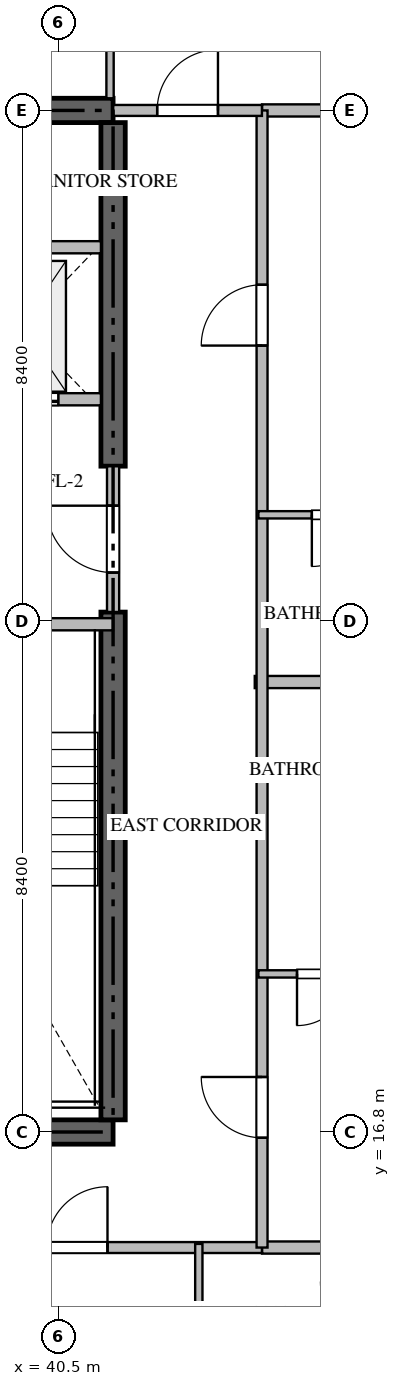
"""IFC4 building model, lengths in metres.
Left out: names, types, materials, properties, quantities, classifications, styles, units other than length and angle.
Written with IfcOpenShell. Run it as: python <this file> out.ifc"""

import sys

from ifc_helpers import new_model, si_unit, direction, frame, frame_2d, origin, place, context, subcontext, project, spatial, rectangle, extrude, source, transform, mapped, element, fill, save


model = new_model("IFC4")
c1 = context("Model", 3, precision=1e-05, world=origin(), true_north=direction((0.0, 1.0)))
c2 = subcontext(c1, "Body", "Model", "MODEL_VIEW")
j1 = project(units=[si_unit("LENGTHUNIT", "METRE"), si_unit("PLANEANGLEUNIT", "RADIAN")], contexts=[c1])
p1 = place(None, origin())
s1 = spatial("IfcSite", under=j1, at=p1, CompositionType="ELEMENT")
p2 = place(p1, origin())
s2 = spatial("IfcBuilding", under=s1, at=p2, CompositionType="ELEMENT")
p3 = place(p2, frame((0.0, 0.0, 157.65)))
s3 = spatial("IfcBuildingStorey", under=s2, at=p3, CompositionType="ELEMENT", Elevation=157.65)
for number, where, z_axis, x_axis in (
    (1, (23.4, 16.8, -0.26), (0.0, 0.0, 1.0), (1.0, 0.0, 0.0)),
    (2, (41.4, 33.6, -0.26), (0.0, 0.0, 1.0), (-1.0, 0.0, 0.0)),
):
    element("IfcWall", number, at=place(p3, frame(where, z_axis=z_axis, x_axis=x_axis)), inside=s3, PredefinedType="SHEAR", context=c2, shape_type="SweptSolid", body=[
        extrude(rectangle(XDim=18.0, YDim=0.4, at=frame_2d((9.0, 0.0))), origin(), (0.0, 0.0, 1.0), 3.748),
    ])
p4 = place(p3, frame((41.4, 17.0, -0.26), z_axis=(0.0, 0.0, 1.0), x_axis=(0.0, 1.0, 0.0)))
e3 = element("IfcWall", 3, at=p4, inside=s3, PredefinedType="SHEAR", context=c2, shape_type="SweptSolid", body=[
    extrude(rectangle(XDim=8.35, YDim=0.4, at=frame_2d((4.175, 0.0))), origin(), (0.0, 0.0, 1.0), 3.748),
])
p5 = place(p3, frame((41.4, 27.75, -0.26), z_axis=(0.0, 0.0, 1.0), x_axis=(0.0, 1.0, 0.0)))
e4 = element("IfcWall", 4, at=p5, inside=s3, PredefinedType="SHEAR", context=c2, shape_type="SweptSolid", body=[
    extrude(rectangle(XDim=5.65, YDim=0.4, at=frame_2d((2.825, 0.0))), origin(), (0.0, 0.0, 1.0), 3.748),
])
p6 = place(p3, frame((36.95, 25.15, 0.0), z_axis=(0.0, 0.0, 1.0), x_axis=(1.0, 0.0, 0.0)))
e5 = element("IfcWall", 5, at=p6, inside=s3, PredefinedType="STANDARD", context=c2, shape_type="SweptSolid", body=[
    extrude(rectangle(XDim=4.45, YDim=0.2, at=frame_2d((2.225, 0.0))), origin(), (0.0, 0.0, 1.0), 3.49),
])
p7 = place(p6, frame((1.65, 0.0, 0.0)))
e6 = element("IfcOpeningElement", 6, at=p7, cuts=e5, PredefinedType="OPENING", context=c2, shape_type="SweptSolid", body=[
    extrude(rectangle(XDim=1.1, YDim=2.15, at=frame_2d((0.55, 1.075))), frame((0.0, 0.11, 0.0), z_axis=(0.0, -1.0, 0.0), x_axis=(1.0, 0.0, 0.0)), (0.0, 0.0, 1.0), 0.22),
])
p8 = place(p3, frame((38.75, 28.85, 0.0), z_axis=(0.0, 0.0, 1.0), x_axis=(1.0, 0.0, 0.0)))
e7 = element("IfcWall", 7, at=p8, inside=s3, PredefinedType="STANDARD", context=c2, shape_type="SweptSolid", body=[
    extrude(rectangle(XDim=2.45, YDim=0.2, at=frame_2d((1.225, 0.0))), origin(), (0.0, 0.0, 1.0), 3.49),
])
p9 = place(p8, frame((0.55, 0.0, 0.0)))
e8 = element("IfcOpeningElement", 8, at=p9, cuts=e7, PredefinedType="OPENING", context=c2, shape_type="SweptSolid", body=[
    extrude(rectangle(XDim=1.2, YDim=2.2, at=frame_2d((0.6, 1.1))), frame((0.0, 0.11, 0.0), z_axis=(0.0, -1.0, 0.0), x_axis=(1.0, 0.0, 0.0)), (0.0, 0.0, 1.0), 0.22),
])
p10 = place(p3, frame((38.75, 31.35, 0.0), z_axis=(0.0, 0.0, 1.0), x_axis=(1.0, 0.0, 0.0)))
e9 = element("IfcWall", 9, at=p10, inside=s3, PredefinedType="STANDARD", context=c2, shape_type="SweptSolid", body=[
    extrude(rectangle(XDim=2.45, YDim=0.2, at=frame_2d((1.225, 0.0))), origin(), (0.0, 0.0, 1.0), 3.49),
])
p11 = place(p3, frame((41.4, 25.352, 0.0), z_axis=(0.0, 0.0, 1.0), x_axis=(0.0, 1.0, 0.0)))
e10 = element("IfcWall", 10, at=p11, inside=s3, PredefinedType="STANDARD", context=c2, shape_type="SweptSolid", body=[
    extrude(rectangle(XDim=2.396, YDim=0.2, at=frame_2d((1.198, 0.0))), origin(), (0.0, 0.0, 1.0), 3.49),
])
p12 = place(p11, frame((0.648, 0.0, 0.0)))
e11 = element("IfcOpeningElement", 11, at=p12, cuts=e10, PredefinedType="OPENING", context=c2, shape_type="SweptSolid", body=[
    extrude(rectangle(XDim=1.1, YDim=2.15, at=frame_2d((0.55, 1.075))), frame((0.0, 0.11, 0.0), z_axis=(0.0, -1.0, 0.0), x_axis=(1.0, 0.0, 0.0)), (0.0, 0.0, 1.0), 0.22),
])
p13 = place(p3, frame((43.73, 24.2, 0.0), z_axis=(0.0, 0.0, 1.0), x_axis=(1.0, 0.0, 0.0)))
e12 = element("IfcWall", 12, at=p13, inside=s3, PredefinedType="PARTITIONING", context=c2, shape_type="SweptSolid", body=[
    extrude(rectangle(XDim=13.188, YDim=0.2, at=frame_2d((6.594, 0.0))), origin(), (0.0, 0.0, 1.0), 3.49),
])
for number, where, z_axis, x_axis in (
    (13, (43.85, 14.9, 0.0), (0.0, 0.0, 1.0), (1.0, 0.0, 0.0)),
    (14, (43.85, 33.6, 0.0), (0.0, 0.0, 1.0), (1.0, 0.0, 0.0)),
):
    element("IfcWall", number, at=place(p3, frame(where, z_axis=z_axis, x_axis=x_axis)), inside=s3, PredefinedType="PARTITIONING", context=c2, shape_type="SweptSolid", body=[
        extrude(rectangle(XDim=13.068, YDim=0.2, at=frame_2d((6.534, 0.0))), origin(), (0.0, 0.0, 1.0), 3.49),
    ])
p14 = place(p3, frame((20.952, 14.9, 0.0), z_axis=(0.0, 0.0, 1.0), x_axis=(1.0, 0.0, 0.0)))
e15 = element("IfcWall", 15, at=p14, inside=s3, PredefinedType="PARTITIONING", context=c2, shape_type="SweptSolid", body=[
    extrude(rectangle(XDim=22.896, YDim=0.18, at=frame_2d((11.448, 0.0))), origin(), (0.0, 0.0, 1.0), 3.49),
])
p15 = place(p14, frame((2.54, 0.0, 0.0)))
e16 = element("IfcOpeningElement", 16, at=p15, cuts=e15, PredefinedType="OPENING", context=c2, shape_type="SweptSolid", body=[
    extrude(rectangle(XDim=1.0, YDim=2.15, at=frame_2d((0.5, 1.075))), frame((0.0, 0.1, 0.0), z_axis=(0.0, -1.0, 0.0), x_axis=(1.0, 0.0, 0.0)), (0.0, 0.0, 1.0), 0.2),
])
p16 = place(p14, frame((6.985, 0.0, 0.0)))
e17 = element("IfcOpeningElement", 17, at=p16, cuts=e15, PredefinedType="OPENING", context=c2, shape_type="SweptSolid", body=[
    extrude(rectangle(XDim=1.0, YDim=2.15, at=frame_2d((0.5, 1.075))), frame((0.0, 0.1, 0.0), z_axis=(0.0, -1.0, 0.0), x_axis=(1.0, 0.0, 0.0)), (0.0, 0.0, 1.0), 0.2),
])
p17 = place(p14, frame((19.356, 0.0, 0.0)))
e18 = element("IfcOpeningElement", 18, at=p17, cuts=e15, PredefinedType="OPENING", context=c2, shape_type="SweptSolid", body=[
    extrude(rectangle(XDim=1.0, YDim=2.15, at=frame_2d((0.5, 1.075))), frame((0.0, 0.1, 0.0), z_axis=(0.0, -1.0, 0.0), x_axis=(1.0, 0.0, 0.0)), (0.0, 0.0, 1.0), 0.2),
])
p18 = place(p3, frame((43.85, 14.9, 0.0), z_axis=(0.0, 0.0, 1.0), x_axis=(0.0, 1.0, 0.0)))
e19 = element("IfcWall", 19, at=p18, inside=s3, PredefinedType="PARTITIONING", context=c2, shape_type="SweptSolid", body=[
    extrude(rectangle(XDim=18.7, YDim=0.18, at=frame_2d((9.35, 0.0))), origin(), (0.0, 0.0, 1.0), 3.49),
])
p19 = place(p18, frame((1.805, 0.0, 0.0)))
e20 = element("IfcOpeningElement", 20, at=p19, cuts=e19, PredefinedType="OPENING", context=c2, shape_type="SweptSolid", body=[
    extrude(rectangle(XDim=1.0, YDim=2.15, at=frame_2d((0.5, 1.075))), frame((0.0, 0.1, 0.0), z_axis=(0.0, -1.0, 0.0), x_axis=(1.0, 0.0, 0.0)), (0.0, 0.0, 1.0), 0.2),
])
p20 = place(p18, frame((14.833, 0.0, 0.0)))
e21 = element("IfcOpeningElement", 21, at=p20, cuts=e19, PredefinedType="OPENING", context=c2, shape_type="SweptSolid", body=[
    extrude(rectangle(XDim=1.0, YDim=2.15, at=frame_2d((0.5, 1.075))), frame((0.0, 0.1, 0.0), z_axis=(0.0, -1.0, 0.0), x_axis=(1.0, 0.0, 0.0)), (0.0, 0.0, 1.0), 0.2),
])
p21 = place(p3, frame((41.402, 33.6, 0.0), z_axis=(0.0, 0.0, 1.0), x_axis=(1.0, 0.0, 0.0)))
e22 = element("IfcWall", 22, at=p21, inside=s3, PredefinedType="PARTITIONING", context=c2, shape_type="SweptSolid", body=[
    extrude(rectangle(XDim=2.446, YDim=0.18, at=frame_2d((1.223, 0.0))), origin(), (0.0, 0.0, 1.0), 3.49),
])
p22 = place(p21, frame((0.723, 0.0, 0.0)))
e23 = element("IfcOpeningElement", 23, at=p22, cuts=e22, PredefinedType="OPENING", context=c2, shape_type="SweptSolid", body=[
    extrude(rectangle(XDim=1.0, YDim=2.15, at=frame_2d((0.5, 1.075))), frame((0.0, 0.1, 0.0), z_axis=(0.0, -1.0, 0.0), x_axis=(1.0, 0.0, 0.0)), (0.0, 0.0, 1.0), 0.2),
])
p23 = place(p3, frame((42.81, 12.15, 0.0), z_axis=(0.0, 0.0, 1.0), x_axis=(0.0, 1.0, 0.0)))
e24 = element("IfcWall", 24, at=p23, inside=s3, PredefinedType="PARTITIONING", context=c2, shape_type="SweptSolid", body=[
    extrude(rectangle(XDim=2.81, YDim=0.12, at=frame_2d((1.405, 0.0))), origin(), (0.0, 0.0, 1.0), 3.49),
])
p24 = place(p3, frame((41.35, 36.35, 0.0), z_axis=(0.0, 0.0, 1.0), x_axis=(0.0, -1.0, 0.0)))
e25 = element("IfcWall", 25, at=p24, inside=s3, PredefinedType="PARTITIONING", context=c2, shape_type="SweptSolid", body=[
    extrude(rectangle(XDim=2.55, YDim=0.12, at=frame_2d((1.275, 0.0))), origin(), (0.0, 0.0, 1.0), 3.49),
])
p25 = place(p3, frame((45.911, 19.4, 0.0), z_axis=(0.0, 0.0, 1.0), x_axis=(-1.0, 0.0, 0.0)))
e26 = element("IfcWall", 26, at=p25, inside=s3, PredefinedType="PARTITIONING", context=c2, shape_type="SweptSolid", body=[
    extrude(rectangle(XDim=2.121, YDim=0.12, at=frame_2d((1.061, 0.0))), origin(), (0.0, 0.0, 1.0), 3.49),
])
p26 = place(p25, frame((0.636, 0.0, 0.0)))
e27 = element("IfcOpeningElement", 27, at=p26, cuts=e26, PredefinedType="OPENING", context=c2, shape_type="SweptSolid", body=[
    extrude(rectangle(XDim=0.85, YDim=2.1, at=frame_2d((0.425, 1.05))), frame((0.0, 0.07, 0.0), z_axis=(0.0, -1.0, 0.0), x_axis=(1.0, 0.0, 0.0)), (0.0, 0.0, 1.0), 0.14),
])
p27 = place(p3, frame((46.398, 26.95, 0.0), z_axis=(0.0, 0.0, 1.0), x_axis=(-1.0, 0.0, 0.0)))
e28 = element("IfcWall", 28, at=p27, inside=s3, PredefinedType="PARTITIONING", context=c2, shape_type="SweptSolid", body=[
    extrude(rectangle(XDim=2.608, YDim=0.12, at=frame_2d((1.304, 0.0))), origin(), (0.0, 0.0, 1.0), 3.49),
])
p28 = place(p27, frame((0.879, 0.0, 0.0)))
e29 = element("IfcOpeningElement", 29, at=p28, cuts=e28, PredefinedType="OPENING", context=c2, shape_type="SweptSolid", body=[
    extrude(rectangle(XDim=0.85, YDim=2.1, at=frame_2d((0.425, 1.05))), frame((0.0, 0.07, 0.0), z_axis=(0.0, -1.0, 0.0), x_axis=(1.0, 0.0, 0.0)), (0.0, 0.0, 1.0), 0.14),
])
m1 = source(origin(), c2, "Body", "SweptSolid", [
    extrude(rectangle(XDim=1.2, YDim=2.2, at=frame_2d((0.6, 1.1))), frame((0.0, 0.025, 0.0), z_axis=(0.0, -1.0, 0.0), x_axis=(1.0, 0.0, 0.0)), (0.0, 0.0, 1.0), 0.05),
])
p29 = place(p9, origin())
e30 = element("IfcDoor", 30, at=p29, inside=s3, OperationType="DOUBLE_DOOR_SLIDING", PredefinedType="DOOR", context=c2, shape_type="MappedRepresentation", body=[
    mapped(m1, transform((0.0, 0.0, 0.0), scale=1.0)),
])
fill(e8, e30)
m2 = source(origin(), c2, "Body", "SweptSolid", [
    extrude(rectangle(XDim=1.1, YDim=2.15, at=frame_2d((0.55, 1.075))), frame((0.0, 0.025, 0.0), z_axis=(0.0, -1.0, 0.0), x_axis=(1.0, 0.0, 0.0)), (0.0, 0.0, 1.0), 0.05),
])
p30 = place(p12, origin())
e31 = element("IfcDoor", 31, at=p30, inside=s3, OperationType="SINGLE_SWING_RIGHT", PredefinedType="DOOR", context=c2, shape_type="MappedRepresentation", body=[
    mapped(m2, transform((0.0, 0.0, 0.0), scale=1.0)),
])
fill(e11, e31)
m3 = source(origin(), c2, "Body", "SweptSolid", [
    extrude(rectangle(XDim=1.0, YDim=2.15, at=frame_2d((0.5, 1.075))), frame((0.0, 0.025, 0.0), z_axis=(0.0, -1.0, 0.0), x_axis=(1.0, 0.0, 0.0)), (0.0, 0.0, 1.0), 0.05),
])
p31 = place(p17, origin())
e32 = element("IfcDoor", 32, at=p31, inside=s3, OperationType="SINGLE_SWING_RIGHT", PredefinedType="DOOR", context=c2, shape_type="MappedRepresentation", body=[
    mapped(m3, transform((0.0, 0.0, 0.0), scale=1.0)),
])
fill(e18, e32)
p32 = place(p19, origin())
e33 = element("IfcDoor", 33, at=p32, inside=s3, OperationType="SINGLE_SWING_RIGHT", PredefinedType="DOOR", context=c2, shape_type="MappedRepresentation", body=[
    mapped(m3, transform((0.0, 0.0, 0.0), scale=1.0)),
])
fill(e20, e33)
p33 = place(p20, origin())
e34 = element("IfcDoor", 34, at=p33, inside=s3, OperationType="SINGLE_SWING_LEFT", PredefinedType="DOOR", context=c2, shape_type="MappedRepresentation", body=[
    mapped(m3, transform((0.0, 0.0, 0.0), scale=1.0)),
])
fill(e21, e34)
p34 = place(p22, origin())
e35 = element("IfcDoor", 35, at=p34, inside=s3, OperationType="SINGLE_SWING_RIGHT", PredefinedType="DOOR", context=c2, shape_type="MappedRepresentation", body=[
    mapped(m3, transform((0.0, 0.0, 0.0), scale=1.0)),
])
fill(e23, e35)
m4 = source(origin(), c2, "Body", "SweptSolid", [
    extrude(rectangle(XDim=0.85, YDim=2.1, at=frame_2d((0.425, 1.05))), frame((0.0, 0.025, 0.0), z_axis=(0.0, -1.0, 0.0), x_axis=(1.0, 0.0, 0.0)), (0.0, 0.0, 1.0), 0.05),
])
p35 = place(p26, origin())
e36 = element("IfcDoor", 36, at=p35, inside=s3, OperationType="SINGLE_SWING_RIGHT", PredefinedType="DOOR", context=c2, shape_type="MappedRepresentation", body=[
    mapped(m4, transform((0.0, 0.0, 0.0), scale=1.0)),
])
fill(e27, e36)
p36 = place(p28, origin())
e37 = element("IfcDoor", 37, at=p36, inside=s3, OperationType="SINGLE_SWING_RIGHT", PredefinedType="DOOR", context=c2, shape_type="MappedRepresentation", body=[
    mapped(m4, transform((0.0, 0.0, 0.0), scale=1.0)),
])
fill(e29, e37)
save(model, sys.argv[1])
